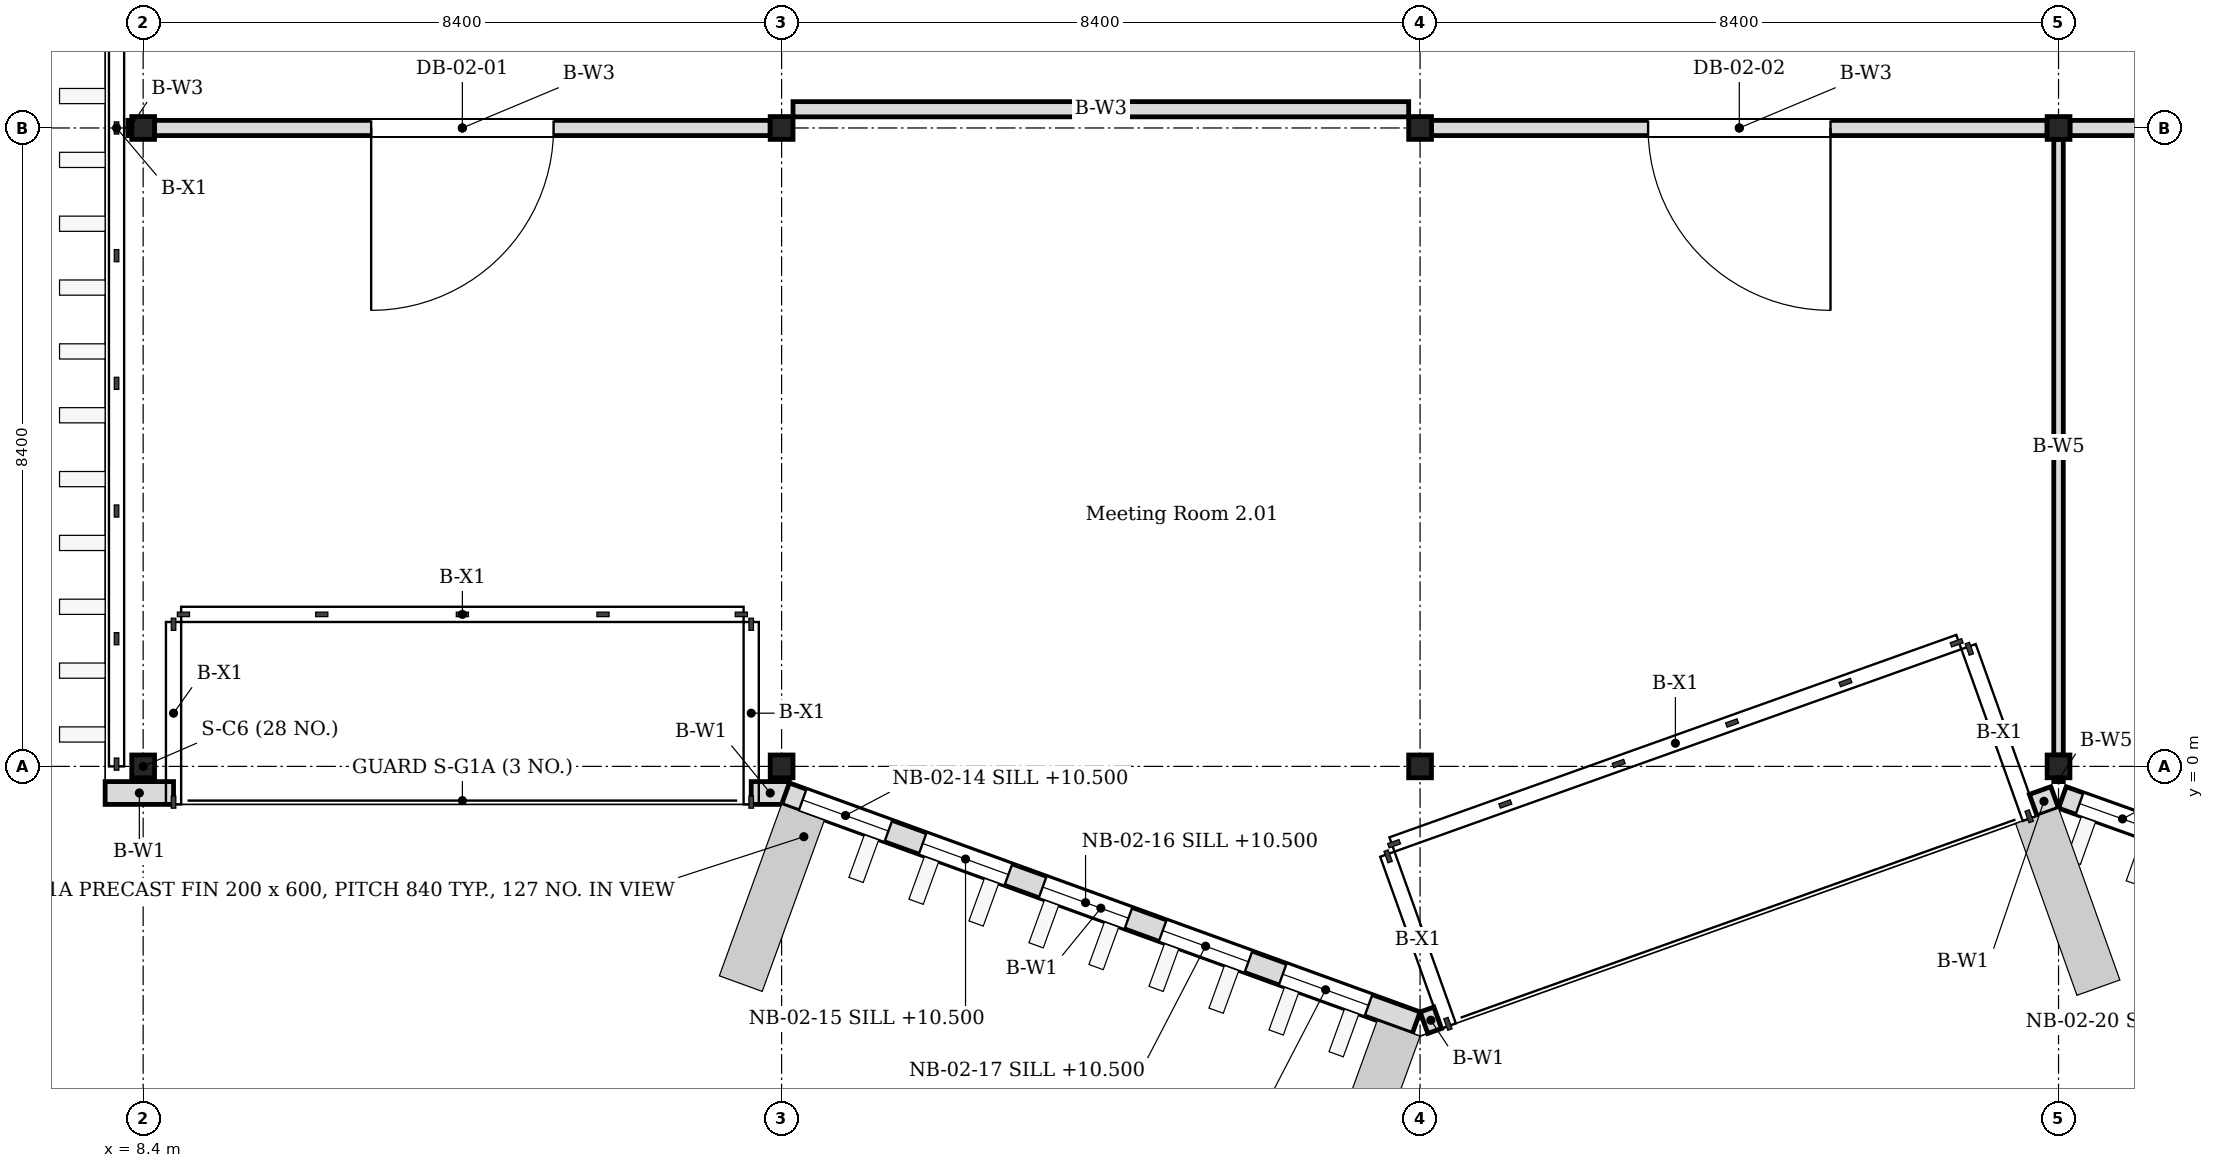
"""IFC4 building model, lengths in metres.
Left out: names, types, materials, properties, quantities, classifications, styles, units other than length and angle.
Written with IfcOpenShell. Run it as: python <this file> out.ifc"""

import sys

from ifc_helpers import new_model, si_unit, direction, frame, frame_2d, origin, origin_2d, place, context, subcontext, project, spatial, rectangle, i_section, extrude, element, fill, save


model = new_model("IFC4")
c1 = context("Model", 3, precision=1e-05, world=origin(), true_north=direction((0.0, 1.0)))
c2 = subcontext(c1, "Body", "Model", "MODEL_VIEW")
j1 = project(units=[si_unit("LENGTHUNIT", "METRE"), si_unit("PLANEANGLEUNIT", "RADIAN")], contexts=[c1])
p1 = place(None, origin())
s1 = spatial("IfcSite", under=j1, at=p1, CompositionType="ELEMENT")
p2 = place(p1, origin())
s2 = spatial("IfcBuilding", under=s1, at=p2, CompositionType="ELEMENT")
p3 = place(p2, frame((0.0, 0.0, 10.2)))
s3 = spatial("IfcBuildingStorey", under=s2, at=p3, CompositionType="ELEMENT", Elevation=10.2)
for number, where, z_axis, x_axis in (
    (1, (8.4, 0.0, 0.0), (0.0, 0.0, 1.0), (1.0, 0.0, 0.0)),
    (2, (8.4, 8.4, 0.0), (0.0, 0.0, 1.0), (1.0, 0.0, 0.0)),
    (3, (16.8, 0.0, 0.0), (0.0, 0.0, 1.0), (1.0, 0.0, 0.0)),
    (4, (16.8, 8.4, 0.0), (0.0, 0.0, 1.0), (1.0, 0.0, 0.0)),
    (5, (25.2, 0.0, 0.0), (0.0, 0.0, 1.0), (1.0, 0.0, 0.0)),
    (6, (25.2, 8.4, 0.0), (0.0, 0.0, 1.0), (1.0, 0.0, 0.0)),
    (7, (33.6, 0.0, 0.0), (0.0, 0.0, 1.0), (1.0, 0.0, 0.0)),
    (8, (33.6, 8.4, 0.0), (0.0, 0.0, 1.0), (1.0, 0.0, 0.0)),
):
    element("IfcColumn", number, at=place(p3, frame(where, z_axis=z_axis, x_axis=x_axis)), inside=s3, PredefinedType="COLUMN", context=c2, shape_type="SweptSolid", body=[
        extrude(i_section(OverallWidth=0.3, OverallDepth=0.3, WebThickness=0.01, FlangeThickness=0.015, FilletRadius=0.013, at=origin_2d()), origin(), (0.0, 0.0, 1.0), 4.2),
    ])
p4 = place(p3, frame((7.9, -0.35, 0.0), z_axis=(0.0, 0.0, 1.0), x_axis=(1.0, 0.0, 0.0)))
e9 = element("IfcWall", 9, at=p4, inside=s3, PredefinedType="SOLIDWALL", context=c2, shape_type="SweptSolid", body=[
    extrude(rectangle(XDim=0.9, YDim=0.3, at=frame_2d((0.45, 0.0))), origin(), (0.0, 0.0, 1.0), 4.05),
])
p5 = place(p3, frame((16.4, -0.35, 0.0), z_axis=(0.0, 0.0, 1.0), x_axis=(1.0, 0.0, 0.0)))
e10 = element("IfcWall", 10, at=p5, inside=s3, PredefinedType="SOLIDWALL", context=c2, shape_type="SweptSolid", body=[
    extrude(rectangle(XDim=0.5, YDim=0.3, at=frame_2d((0.25, 0.0))), origin(), (0.0, 0.0, 1.0), 4.05),
])
p6 = place(p3, frame((16.851, -0.359, 0.0), z_axis=(0.0, 0.0, 1.0), x_axis=(0.939953187971, -0.341303390584, 0.0)))
e11 = element("IfcWall", 11, at=p6, inside=s3, PredefinedType="SOLIDWALL", context=c2, shape_type="SweptSolid", body=[
    extrude(rectangle(XDim=8.828, YDim=0.3, at=frame_2d((4.414, 0.0))), origin(), (0.0, 0.0, 1.0), 4.05),
])
p7 = place(p6, frame((0.24, 0.0, 0.3)))
e12 = element("IfcOpeningElement", 12, at=p7, cuts=e11, PredefinedType="OPENING", context=c2, shape_type="SweptSolid", body=[
    extrude(rectangle(XDim=1.2, YDim=3.3, at=frame_2d((0.6, 1.65))), frame((0.0, 0.16, 0.0), z_axis=(0.0, -1.0, 0.0), x_axis=(1.0, 0.0, 0.0)), (0.0, 0.0, 1.0), 0.32),
])
p8 = place(p6, frame((1.92, 0.0, 0.3)))
e13 = element("IfcOpeningElement", 13, at=p8, cuts=e11, PredefinedType="OPENING", context=c2, shape_type="SweptSolid", body=[
    extrude(rectangle(XDim=1.2, YDim=3.3, at=frame_2d((0.6, 1.65))), frame((0.0, 0.16, 0.0), z_axis=(0.0, -1.0, 0.0), x_axis=(1.0, 0.0, 0.0)), (0.0, 0.0, 1.0), 0.32),
])
p9 = place(p6, frame((3.6, 0.0, 0.3)))
e14 = element("IfcOpeningElement", 14, at=p9, cuts=e11, PredefinedType="OPENING", context=c2, shape_type="SweptSolid", body=[
    extrude(rectangle(XDim=1.2, YDim=3.3, at=frame_2d((0.6, 1.65))), frame((0.0, 0.16, 0.0), z_axis=(0.0, -1.0, 0.0), x_axis=(1.0, 0.0, 0.0)), (0.0, 0.0, 1.0), 0.32),
])
p10 = place(p6, frame((5.28, 0.0, 0.3)))
e15 = element("IfcOpeningElement", 15, at=p10, cuts=e11, PredefinedType="OPENING", context=c2, shape_type="SweptSolid", body=[
    extrude(rectangle(XDim=1.2, YDim=3.3, at=frame_2d((0.6, 1.65))), frame((0.0, 0.16, 0.0), z_axis=(0.0, -1.0, 0.0), x_axis=(1.0, 0.0, 0.0)), (0.0, 0.0, 1.0), 0.32),
])
p11 = place(p6, frame((6.96, 0.0, 0.3)))
e16 = element("IfcOpeningElement", 16, at=p11, cuts=e11, PredefinedType="OPENING", context=c2, shape_type="SweptSolid", body=[
    extrude(rectangle(XDim=1.2, YDim=3.3, at=frame_2d((0.6, 1.65))), frame((0.0, 0.16, 0.0), z_axis=(0.0, -1.0, 0.0), x_axis=(1.0, 0.0, 0.0)), (0.0, 0.0, 1.0), 0.32),
])
p12 = place(p3, frame((25.251, -3.372, 0.0), z_axis=(0.0, 0.0, 1.0), x_axis=(0.942000485661, 0.335611509061, 0.0)))
e17 = element("IfcWall", 17, at=p12, inside=s3, PredefinedType="SOLIDWALL", context=c2, shape_type="SweptSolid", body=[
    extrude(rectangle(XDim=0.192, YDim=0.3, at=frame_2d((0.096, 0.0))), origin(), (0.0, 0.0, 1.0), 4.05),
])
p13 = place(p3, frame((33.267, -0.51, 0.0), z_axis=(0.0, 0.0, 1.0), x_axis=(0.941797147708, 0.336181695768, 0.0)))
e18 = element("IfcWall", 18, at=p13, inside=s3, PredefinedType="SOLIDWALL", context=c2, shape_type="SweptSolid", body=[
    extrude(rectangle(XDim=0.3, YDim=0.3, at=frame_2d((0.15, 0.0))), origin(), (0.0, 0.0, 1.0), 4.05),
])
p14 = place(p3, frame((33.65, -0.409, 0.0), z_axis=(0.0, 0.0, 1.0), x_axis=(0.941736270411, -0.336352191894, 0.0)))
e19 = element("IfcWall", 19, at=p14, inside=s3, PredefinedType="SOLIDWALL", context=c2, shape_type="SweptSolid", body=[
    extrude(rectangle(XDim=8.812, YDim=0.3, at=frame_2d((4.406, 0.0))), origin(), (0.0, 0.0, 1.0), 4.05),
])
p15 = place(p14, frame((0.24, 0.0, 0.3)))
e20 = element("IfcOpeningElement", 20, at=p15, cuts=e19, PredefinedType="OPENING", context=c2, shape_type="SweptSolid", body=[
    extrude(rectangle(XDim=1.2, YDim=3.3, at=frame_2d((0.6, 1.65))), frame((0.0, 0.16, 0.0), z_axis=(0.0, -1.0, 0.0), x_axis=(1.0, 0.0, 0.0)), (0.0, 0.0, 1.0), 0.32),
])
p16 = place(p14, frame((1.92, 0.0, 0.3)))
e21 = element("IfcOpeningElement", 21, at=p16, cuts=e19, PredefinedType="OPENING", context=c2, shape_type="SweptSolid", body=[
    extrude(rectangle(XDim=1.2, YDim=3.3, at=frame_2d((0.6, 1.65))), frame((0.0, 0.16, 0.0), z_axis=(0.0, -1.0, 0.0), x_axis=(1.0, 0.0, 0.0)), (0.0, 0.0, 1.0), 0.32),
])
p17 = place(p14, frame((3.6, 0.0, 0.3)))
e22 = element("IfcOpeningElement", 22, at=p17, cuts=e19, PredefinedType="OPENING", context=c2, shape_type="SweptSolid", body=[
    extrude(rectangle(XDim=1.2, YDim=3.3, at=frame_2d((0.6, 1.65))), frame((0.0, 0.16, 0.0), z_axis=(0.0, -1.0, 0.0), x_axis=(1.0, 0.0, 0.0)), (0.0, 0.0, 1.0), 0.32),
])
p18 = place(p14, frame((5.28, 0.0, 0.3)))
e23 = element("IfcOpeningElement", 23, at=p18, cuts=e19, PredefinedType="OPENING", context=c2, shape_type="SweptSolid", body=[
    extrude(rectangle(XDim=1.2, YDim=3.3, at=frame_2d((0.6, 1.65))), frame((0.0, 0.16, 0.0), z_axis=(0.0, -1.0, 0.0), x_axis=(1.0, 0.0, 0.0)), (0.0, 0.0, 1.0), 0.32),
])
p19 = place(p14, frame((6.96, 0.0, 0.3)))
e24 = element("IfcOpeningElement", 24, at=p19, cuts=e19, PredefinedType="OPENING", context=c2, shape_type="SweptSolid", body=[
    extrude(rectangle(XDim=1.2, YDim=3.3, at=frame_2d((0.6, 1.65))), frame((0.0, 0.16, 0.0), z_axis=(0.0, -1.0, 0.0), x_axis=(1.0, 0.0, 0.0)), (0.0, 0.0, 1.0), 0.32),
])
p20 = place(p3, frame((8.2, 8.4, 0.0), z_axis=(0.0, 0.0, 1.0), x_axis=(1.0, 0.0, 0.0)))
e25 = element("IfcWall", 25, at=p20, inside=s3, PredefinedType="PARTITIONING", context=c2, shape_type="SweptSolid", body=[
    extrude(rectangle(XDim=0.05, YDim=0.2, at=frame_2d((0.025, 0.0))), origin(), (0.0, 0.0, 1.0), 3.35),
])
p21 = place(p3, frame((8.55, 8.4, 0.0), z_axis=(0.0, 0.0, 1.0), x_axis=(1.0, 0.0, 0.0)))
e26 = element("IfcWall", 26, at=p21, inside=s3, PredefinedType="PARTITIONING", context=c2, shape_type="SweptSolid", body=[
    extrude(rectangle(XDim=8.1, YDim=0.2, at=frame_2d((4.05, 0.0))), origin(), (0.0, 0.0, 1.0), 3.35),
])
p22 = place(p21, frame((2.85, 0.0, 0.0)))
e27 = element("IfcOpeningElement", 27, at=p22, cuts=e26, PredefinedType="OPENING", context=c2, shape_type="SweptSolid", body=[
    extrude(rectangle(XDim=2.4, YDim=2.2, at=frame_2d((1.2, 1.1))), frame((0.0, 0.11, 0.0), z_axis=(0.0, -1.0, 0.0), x_axis=(1.0, 0.0, 0.0)), (0.0, 0.0, 1.0), 0.22),
])
p23 = place(p3, frame((16.95, 8.646, 0.0), z_axis=(0.0, 0.0, 1.0), x_axis=(1.0, 0.0, 0.0)))
e28 = element("IfcWall", 28, at=p23, inside=s3, PredefinedType="PARTITIONING", context=c2, shape_type="SweptSolid", body=[
    extrude(rectangle(XDim=8.1, YDim=0.2, at=frame_2d((4.05, 0.0))), origin(), (0.0, 0.0, 1.0), 3.35),
])
p24 = place(p3, frame((25.35, 8.4, 0.0), z_axis=(0.0, 0.0, 1.0), x_axis=(1.0, 0.0, 0.0)))
e29 = element("IfcWall", 29, at=p24, inside=s3, PredefinedType="PARTITIONING", context=c2, shape_type="SweptSolid", body=[
    extrude(rectangle(XDim=8.1, YDim=0.2, at=frame_2d((4.05, 0.0))), origin(), (0.0, 0.0, 1.0), 3.35),
])
p25 = place(p24, frame((2.85, 0.0, 0.0)))
e30 = element("IfcOpeningElement", 30, at=p25, cuts=e29, PredefinedType="OPENING", context=c2, shape_type="SweptSolid", body=[
    extrude(rectangle(XDim=2.4, YDim=2.2, at=frame_2d((1.2, 1.1))), frame((0.0, 0.11, 0.0), z_axis=(0.0, -1.0, 0.0), x_axis=(1.0, 0.0, 0.0)), (0.0, 0.0, 1.0), 0.22),
])
p26 = place(p3, frame((33.75, 8.4, 0.0), z_axis=(0.0, 0.0, 1.0), x_axis=(1.0, 0.0, 0.0)))
e31 = element("IfcWall", 31, at=p26, inside=s3, PredefinedType="PARTITIONING", context=c2, shape_type="SweptSolid", body=[
    extrude(rectangle(XDim=8.1, YDim=0.2, at=frame_2d((4.05, 0.0))), origin(), (0.0, 0.0, 1.0), 3.35),
])
p27 = place(p26, frame((3.15, 0.0, 0.0)))
e32 = element("IfcOpeningElement", 32, at=p27, cuts=e31, PredefinedType="OPENING", context=c2, shape_type="SweptSolid", body=[
    extrude(rectangle(XDim=1.8, YDim=2.1, at=frame_2d((0.9, 1.05))), frame((0.0, 0.11, 0.0), z_axis=(0.0, -1.0, 0.0), x_axis=(1.0, 0.0, 0.0)), (0.0, 0.0, 1.0), 0.22),
])
p28 = place(p3, frame((33.6, -0.2, 0.0), z_axis=(0.0, 0.0, 1.0), x_axis=(0.0, 1.0, 0.0)))
e33 = element("IfcWall", 33, at=p28, inside=s3, PredefinedType="MOVABLE", context=c2, shape_type="SweptSolid", body=[
    extrude(rectangle(XDim=0.05, YDim=0.125, at=frame_2d((0.025, 0.0))), origin(), (0.0, 0.0, 1.0), 3.35),
])
p29 = place(p3, frame((33.6, 0.15, 0.0), z_axis=(0.0, 0.0, 1.0), x_axis=(0.0, 1.0, 0.0)))
e34 = element("IfcWall", 34, at=p29, inside=s3, PredefinedType="MOVABLE", context=c2, shape_type="SweptSolid", body=[
    extrude(rectangle(XDim=8.1, YDim=0.125, at=frame_2d((4.05, 0.0))), origin(), (0.0, 0.0, 1.0), 3.35),
])
p30 = place(p7, origin())
e35 = element("IfcWindow", 35, at=p30, inside=s3, PartitioningType="TRIPLE_PANEL_VERTICAL", PredefinedType="WINDOW", context=c2, shape_type="SweptSolid", body=[
    extrude(rectangle(XDim=1.2, YDim=3.3, at=frame_2d((0.6, 1.65))), frame((0.0, 0.03, 0.0), z_axis=(0.0, -1.0, 0.0), x_axis=(1.0, 0.0, 0.0)), (0.0, 0.0, 1.0), 0.06),
])
fill(e12, e35)
p31 = place(p8, origin())
e36 = element("IfcWindow", 36, at=p31, inside=s3, PartitioningType="TRIPLE_PANEL_VERTICAL", PredefinedType="WINDOW", context=c2, shape_type="SweptSolid", body=[
    extrude(rectangle(XDim=1.2, YDim=3.3, at=frame_2d((0.6, 1.65))), frame((0.0, 0.03, 0.0), z_axis=(0.0, -1.0, 0.0), x_axis=(1.0, 0.0, 0.0)), (0.0, 0.0, 1.0), 0.06),
])
fill(e13, e36)
p32 = place(p9, origin())
e37 = element("IfcWindow", 37, at=p32, inside=s3, PartitioningType="TRIPLE_PANEL_VERTICAL", PredefinedType="WINDOW", context=c2, shape_type="SweptSolid", body=[
    extrude(rectangle(XDim=1.2, YDim=3.3, at=frame_2d((0.6, 1.65))), frame((0.0, 0.03, 0.0), z_axis=(0.0, -1.0, 0.0), x_axis=(1.0, 0.0, 0.0)), (0.0, 0.0, 1.0), 0.06),
])
fill(e14, e37)
p33 = place(p10, origin())
e38 = element("IfcWindow", 38, at=p33, inside=s3, PartitioningType="TRIPLE_PANEL_VERTICAL", PredefinedType="WINDOW", context=c2, shape_type="SweptSolid", body=[
    extrude(rectangle(XDim=1.2, YDim=3.3, at=frame_2d((0.6, 1.65))), frame((0.0, 0.03, 0.0), z_axis=(0.0, -1.0, 0.0), x_axis=(1.0, 0.0, 0.0)), (0.0, 0.0, 1.0), 0.06),
])
fill(e15, e38)
p34 = place(p11, origin())
e39 = element("IfcWindow", 39, at=p34, inside=s3, PartitioningType="TRIPLE_PANEL_VERTICAL", PredefinedType="WINDOW", context=c2, shape_type="SweptSolid", body=[
    extrude(rectangle(XDim=1.2, YDim=3.3, at=frame_2d((0.6, 1.65))), frame((0.0, 0.03, 0.0), z_axis=(0.0, -1.0, 0.0), x_axis=(1.0, 0.0, 0.0)), (0.0, 0.0, 1.0), 0.06),
])
fill(e16, e39)
p35 = place(p15, origin())
e40 = element("IfcWindow", 40, at=p35, inside=s3, PartitioningType="TRIPLE_PANEL_VERTICAL", PredefinedType="WINDOW", context=c2, shape_type="SweptSolid", body=[
    extrude(rectangle(XDim=1.2, YDim=3.3, at=frame_2d((0.6, 1.65))), frame((0.0, 0.03, 0.0), z_axis=(0.0, -1.0, 0.0), x_axis=(1.0, 0.0, 0.0)), (0.0, 0.0, 1.0), 0.06),
])
fill(e20, e40)
p36 = place(p22, origin())
e41 = element("IfcDoor", 41, at=p36, inside=s3, OperationType="DOUBLE_DOOR_SINGLE_SWING", PredefinedType="DOOR", context=c2, shape_type="SweptSolid", body=[
    extrude(rectangle(XDim=2.4, YDim=2.2, at=frame_2d((1.2, 1.1))), frame((0.0, 0.025, 0.0), z_axis=(0.0, -1.0, 0.0), x_axis=(1.0, 0.0, 0.0)), (0.0, 0.0, 1.0), 0.05),
])
fill(e27, e41)
p37 = place(p25, origin())
e42 = element("IfcDoor", 42, at=p37, inside=s3, OperationType="DOUBLE_DOOR_SINGLE_SWING", PredefinedType="DOOR", context=c2, shape_type="SweptSolid", body=[
    extrude(rectangle(XDim=2.4, YDim=2.2, at=frame_2d((1.2, 1.1))), frame((0.0, 0.025, 0.0), z_axis=(0.0, -1.0, 0.0), x_axis=(1.0, 0.0, 0.0)), (0.0, 0.0, 1.0), 0.05),
])
fill(e30, e42)
save(model, sys.argv[1])
